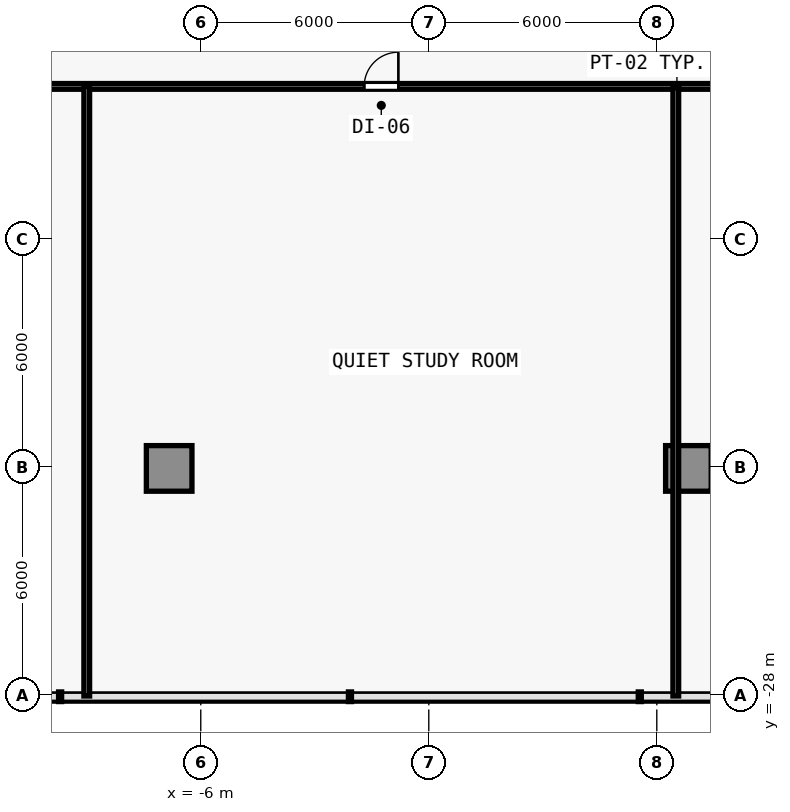
"""IFC4 building model, lengths in metres.
Left out: names, types, materials, properties, quantities, classifications, styles, units other than length and angle.
Written with IfcOpenShell. Run it as: python <this file> out.ifc"""

import sys

from ifc_helpers import new_model, si_unit, direction, frame, frame_2d, origin, origin_2d, place, context, subcontext, project, spatial, rectangle, extrude, element, fill, save


model = new_model("IFC4")
c1 = context("Model", 3, precision=1e-05, world=origin(), true_north=direction((0.0, 1.0)))
c2 = subcontext(c1, "Body", "Model", "MODEL_VIEW")
j1 = project(units=[si_unit("LENGTHUNIT", "METRE"), si_unit("PLANEANGLEUNIT", "RADIAN")], contexts=[c1])
p1 = place(None, origin())
s1 = spatial("IfcSite", under=j1, at=p1, CompositionType="ELEMENT")
p2 = place(p1, origin())
s2 = spatial("IfcBuilding", under=s1, at=p2, CompositionType="ELEMENT")
p3 = place(p2, frame((0.0, 0.0, 17.6)))
s3 = spatial("IfcBuildingStorey", under=s2, at=p3, CompositionType="ELEMENT", Elevation=17.6)
for number, where, z_axis, x_axis in (
    (1, (-6.832, -22.032, 0.0), (0.0, 0.0, 1.0), (1.0, 0.0, 0.0)),
    (2, (6.832, -22.032, 0.0), (0.0, 0.0, 1.0), (1.0, 0.0, 0.0)),
):
    element("IfcColumn", number, at=place(p3, frame(where, z_axis=z_axis, x_axis=x_axis)), inside=s3, PredefinedType="COLUMN", context=c2, shape_type="SweptSolid", body=[
        extrude(rectangle(XDim=1.2, YDim=1.2, at=origin_2d()), origin(), (0.0, 0.0, 1.0), 4.2),
    ])
p4 = place(p3, frame((-10.22, -11.98, 0.0), z_axis=(0.0, 0.0, 1.0), x_axis=(1.0, 0.0, 0.0)))
e3 = element("IfcWall", 3, at=p4, inside=s3, PredefinedType="PARTITIONING", context=c2, shape_type="SweptSolid", body=[
    extrude(rectangle(XDim=33.5, YDim=0.15, at=frame_2d((16.75, 0.0))), origin(), (0.0, 0.0, 1.0), 3.155),
])
p5 = place(p4, frame((8.52, 0.0, 0.0)))
e4 = element("IfcOpeningElement", 4, at=p5, cuts=e3, PredefinedType="OPENING", context=c2, shape_type="SweptSolid", body=[
    extrude(rectangle(XDim=0.9, YDim=2.1, at=frame_2d((0.45, 1.05))), frame((0.0, 0.085, 0.0), z_axis=(0.0, -1.0, 0.0), x_axis=(1.0, 0.0, 0.0)), (0.0, 0.0, 1.0), 0.17),
])
p6 = place(p4, frame((23.27, 0.0, 0.0)))
e5 = element("IfcOpeningElement", 5, at=p6, cuts=e3, PredefinedType="OPENING", context=c2, shape_type="SweptSolid", body=[
    extrude(rectangle(XDim=0.9, YDim=2.1, at=frame_2d((0.45, 1.05))), frame((0.0, 0.085, 0.0), z_axis=(0.0, -1.0, 0.0), x_axis=(1.0, 0.0, 0.0)), (0.0, 0.0, 1.0), 0.17),
])
for number, where, z_axis, x_axis in (
    (6, (-9.0, -28.02, 0.0), (0.0, 0.0, 1.0), (0.0, 1.0, 0.0)),
    (7, (6.5, -28.02, 0.0), (0.0, 0.0, 1.0), (0.0, 1.0, 0.0)),
):
    element("IfcWall", number, at=place(p3, frame(where, z_axis=z_axis, x_axis=x_axis)), inside=s3, PredefinedType="PARTITIONING", context=c2, shape_type="SweptSolid", body=[
        extrude(rectangle(XDim=16.04, YDim=0.15, at=frame_2d((8.02, 0.0))), origin(), (0.0, 0.0, 1.0), 3.155),
    ])
p7 = place(p5, origin())
e8 = element("IfcDoor", 8, at=p7, inside=s3, OperationType="SINGLE_SWING_RIGHT", PredefinedType="DOOR", context=c2, shape_type="SweptSolid", body=[
    extrude(rectangle(XDim=0.9, YDim=2.1, at=frame_2d((0.45, 1.05))), frame((0.0, 0.025, 0.0), z_axis=(0.0, -1.0, 0.0), x_axis=(1.0, 0.0, 0.0)), (0.0, 0.0, 1.0), 0.05),
])
fill(e4, e8)
save(model, sys.argv[1])
